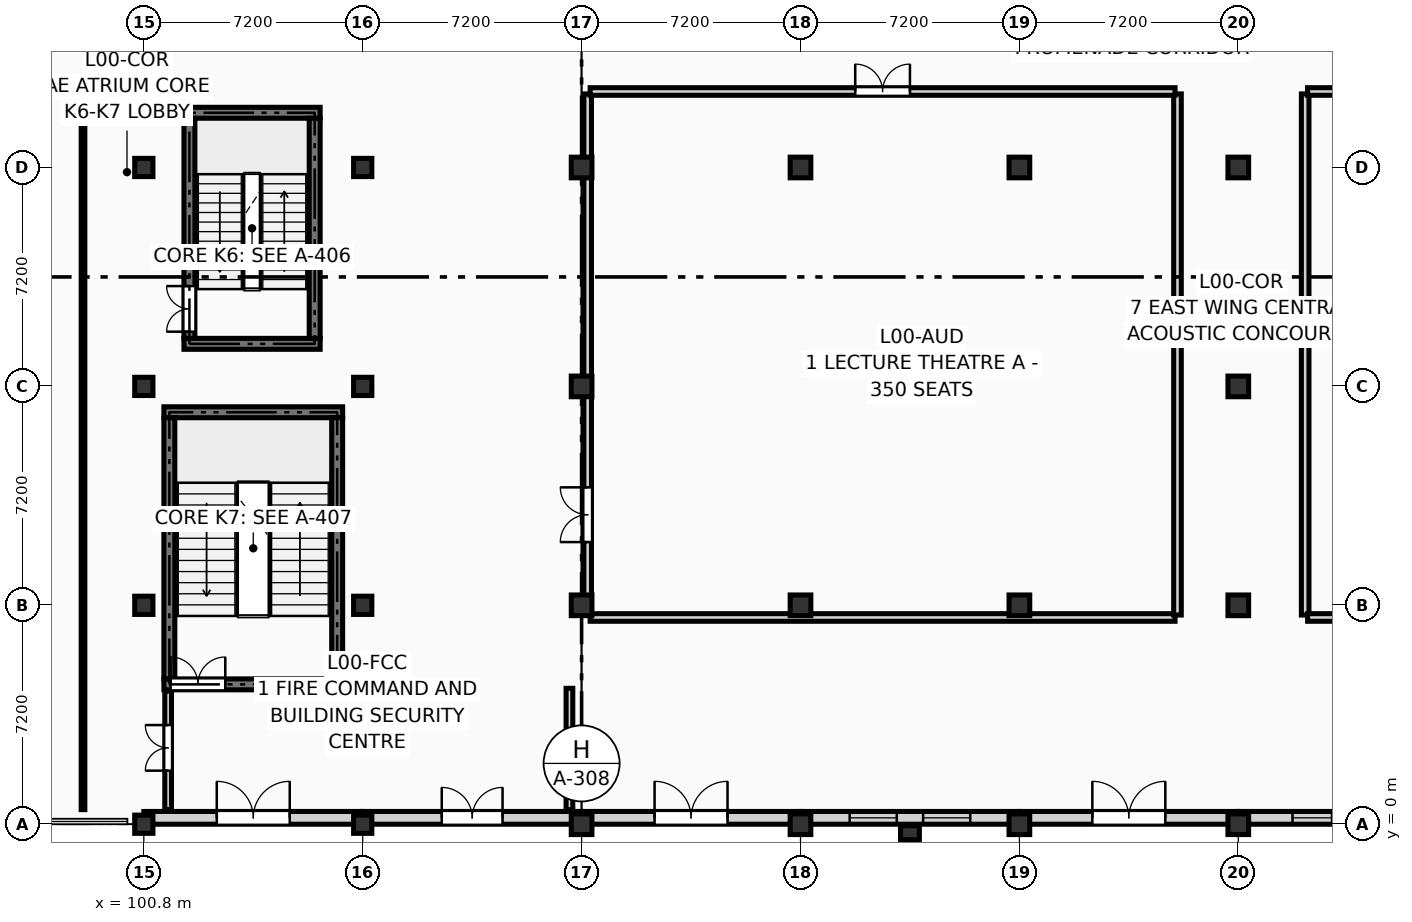
"""IFC4 building model, lengths in metres.
Left out: names, types, materials, properties, quantities, classifications, styles, units other than length and angle.
Written with IfcOpenShell. Run it as: python <this file> out.ifc"""

import sys

from ifc_helpers import new_model, si_unit, direction, frame, frame_2d, origin, origin_2d, place, context, subcontext, project, spatial, rectangle, extrude, element, fill, save


model = new_model("IFC4")
c1 = context("Model", 3, precision=1e-05, world=origin(), true_north=direction((0.0, 1.0)))
c2 = subcontext(c1, "Body", "Model", "MODEL_VIEW")
j1 = project(units=[si_unit("LENGTHUNIT", "METRE"), si_unit("PLANEANGLEUNIT", "RADIAN")], contexts=[c1])
p1 = place(None, origin())
s1 = spatial("IfcSite", under=j1, at=p1, CompositionType="ELEMENT")
p2 = place(p1, origin())
s2 = spatial("IfcBuilding", under=s1, at=p2, CompositionType="ELEMENT")
p3 = place(p2, origin())
s3 = spatial("IfcBuildingStorey", under=s2, at=p3, CompositionType="ELEMENT", Elevation=0.0)
for number, where, z_axis, x_axis in (
    (1, (100.8, 0.0, 0.0), (0.0, 0.0, 1.0), (1.0, 0.0, 0.0)),
    (2, (100.8, 7.2, 0.0), (0.0, 0.0, 1.0), (1.0, 0.0, 0.0)),
    (3, (100.8, 14.4, 0.0), (0.0, 0.0, 1.0), (1.0, 0.0, 0.0)),
    (4, (100.8, 21.6, 0.0), (0.0, 0.0, 1.0), (1.0, 0.0, 0.0)),
    (5, (108.0, 0.0, 0.0), (0.0, 0.0, 1.0), (1.0, 0.0, 0.0)),
    (6, (108.0, 7.2, 0.0), (0.0, 0.0, 1.0), (1.0, 0.0, 0.0)),
    (7, (108.0, 14.4, 0.0), (0.0, 0.0, 1.0), (1.0, 0.0, 0.0)),
    (8, (108.0, 21.6, 0.0), (0.0, 0.0, 1.0), (1.0, 0.0, 0.0)),
):
    element("IfcColumn", number, at=place(p3, frame(where, z_axis=z_axis, x_axis=x_axis)), inside=s3, PredefinedType="COLUMN", context=c2, shape_type="SweptSolid", body=[
        extrude(rectangle(XDim=0.6, YDim=0.6, at=origin_2d()), origin(), (0.0, 0.0, 1.0), 4.5),
    ])
for number, where, z_axis, x_axis in (
    (9, (115.2, 0.0, 0.0), (0.0, 0.0, 1.0), (1.0, 0.0, 0.0)),
    (10, (115.2, 7.2, 0.0), (0.0, 0.0, 1.0), (1.0, 0.0, 0.0)),
    (11, (115.2, 14.4, 0.0), (0.0, 0.0, 1.0), (1.0, 0.0, 0.0)),
    (12, (115.2, 21.6, 0.0), (0.0, 0.0, 1.0), (1.0, 0.0, 0.0)),
    (13, (122.4, 0.0, 0.0), (0.0, 0.0, 1.0), (1.0, 0.0, 0.0)),
    (14, (122.4, 7.2, 0.0), (0.0, 0.0, 1.0), (1.0, 0.0, 0.0)),
    (15, (122.4, 21.6, 0.0), (0.0, 0.0, 1.0), (1.0, 0.0, 0.0)),
    (16, (129.6, 0.0, 0.0), (0.0, 0.0, 1.0), (1.0, 0.0, 0.0)),
    (17, (129.6, 7.2, 0.0), (0.0, 0.0, 1.0), (1.0, 0.0, 0.0)),
    (18, (129.6, 21.6, 0.0), (0.0, 0.0, 1.0), (1.0, 0.0, 0.0)),
    (19, (136.8, 0.0, 0.0), (0.0, 0.0, 1.0), (1.0, 0.0, 0.0)),
    (20, (136.8, 7.2, 0.0), (0.0, 0.0, 1.0), (1.0, 0.0, 0.0)),
    (21, (136.8, 14.4, 0.0), (0.0, 0.0, 1.0), (1.0, 0.0, 0.0)),
    (22, (136.8, 21.6, 0.0), (0.0, 0.0, 1.0), (1.0, 0.0, 0.0)),
):
    element("IfcColumn", number, at=place(p3, frame(where, z_axis=z_axis, x_axis=x_axis)), inside=s3, PredefinedType="COLUMN", context=c2, shape_type="SweptSolid", body=[
        extrude(rectangle(XDim=0.68, YDim=0.68, at=origin_2d()), origin(), (0.0, 0.0, 1.0), 4.5),
    ])
p4 = place(p3, frame((126.0, -0.28, 0.0), z_axis=(0.0, 0.0, 1.0), x_axis=(0.0, 1.0, 0.0)))
e23 = element("IfcColumn", 23, at=p4, inside=s3, PredefinedType="PILASTER", context=c2, shape_type="SweptSolid", body=[
    extrude(rectangle(XDim=0.46, YDim=0.62, at=origin_2d()), origin(), (0.0, 0.0, 1.0), 4.5),
])
p5 = place(p3, frame((136.8, 0.21, 0.0), z_axis=(0.0, 0.0, 1.0), x_axis=(1.0, 0.0, 0.0)))
e24 = element("IfcWall", 24, at=p5, inside=s3, PredefinedType="SOLIDWALL", context=c2, shape_type="SweptSolid", body=[
    extrude(rectangle(XDim=7.2, YDim=0.42, at=frame_2d((3.6, 0.0))), origin(), (0.0, 0.0, 1.0), 3.62),
])
p6 = place(p5, frame((1.783, 0.0, 0.45)))
e25 = element("IfcOpeningElement", 25, at=p6, cuts=e24, PredefinedType="OPENING", context=c2, shape_type="SweptSolid", body=[
    extrude(rectangle(XDim=1.3, YDim=2.35, at=frame_2d((0.65, 1.175))), frame((0.0, 0.222, 0.0), z_axis=(0.0, -1.0, 0.0), x_axis=(1.0, 0.0, 0.0)), (0.0, 0.0, 1.0), 0.444),
])
p7 = place(p5, frame((4.117, 0.0, 0.45)))
e26 = element("IfcOpeningElement", 26, at=p7, cuts=e24, PredefinedType="OPENING", context=c2, shape_type="SweptSolid", body=[
    extrude(rectangle(XDim=1.3, YDim=2.35, at=frame_2d((0.65, 1.175))), frame((0.0, 0.222, 0.0), z_axis=(0.0, -1.0, 0.0), x_axis=(1.0, 0.0, 0.0)), (0.0, 0.0, 1.0), 0.444),
])
p8 = place(p3, frame((129.6, 0.21, 0.0), z_axis=(0.0, 0.0, 1.0), x_axis=(1.0, 0.0, 0.0)))
e27 = element("IfcWall", 27, at=p8, inside=s3, PredefinedType="SOLIDWALL", context=c2, shape_type="SweptSolid", body=[
    extrude(rectangle(XDim=7.2, YDim=0.42, at=frame_2d((3.6, 0.0))), origin(), (0.0, 0.0, 1.0), 3.62),
])
p9 = place(p8, frame((2.4, 0.0, 0.0)))
e28 = element("IfcOpeningElement", 28, at=p9, cuts=e27, PredefinedType="OPENING", context=c2, shape_type="SweptSolid", body=[
    extrude(rectangle(XDim=2.4, YDim=2.6, at=frame_2d((1.2, 1.3))), frame((0.0, 0.222, 0.0), z_axis=(0.0, -1.0, 0.0), x_axis=(1.0, 0.0, 0.0)), (0.0, 0.0, 1.0), 0.444),
])
p10 = place(p3, frame((122.4, 0.21, 0.0), z_axis=(0.0, 0.0, 1.0), x_axis=(1.0, 0.0, 0.0)))
e29 = element("IfcWall", 29, at=p10, inside=s3, PredefinedType="SOLIDWALL", context=c2, shape_type="SweptSolid", body=[
    extrude(rectangle(XDim=7.2, YDim=0.42, at=frame_2d((3.6, 0.0))), origin(), (0.0, 0.0, 1.0), 3.62),
])
p11 = place(p10, frame((1.617, 0.0, 0.45)))
e30 = element("IfcOpeningElement", 30, at=p11, cuts=e29, PredefinedType="OPENING", context=c2, shape_type="SweptSolid", body=[
    extrude(rectangle(XDim=1.55, YDim=2.85, at=frame_2d((0.775, 1.425))), frame((0.0, 0.222, 0.0), z_axis=(0.0, -1.0, 0.0), x_axis=(1.0, 0.0, 0.0)), (0.0, 0.0, 1.0), 0.444),
])
p12 = place(p10, frame((4.033, 0.0, 0.45)))
e31 = element("IfcOpeningElement", 31, at=p12, cuts=e29, PredefinedType="OPENING", context=c2, shape_type="SweptSolid", body=[
    extrude(rectangle(XDim=1.55, YDim=2.85, at=frame_2d((0.775, 1.425))), frame((0.0, 0.222, 0.0), z_axis=(0.0, -1.0, 0.0), x_axis=(1.0, 0.0, 0.0)), (0.0, 0.0, 1.0), 0.444),
])
p13 = place(p3, frame((115.2, 0.21, 0.0), z_axis=(0.0, 0.0, 1.0), x_axis=(1.0, 0.0, 0.0)))
e32 = element("IfcWall", 32, at=p13, inside=s3, PredefinedType="SOLIDWALL", context=c2, shape_type="SweptSolid", body=[
    extrude(rectangle(XDim=7.2, YDim=0.42, at=frame_2d((3.6, 0.0))), origin(), (0.0, 0.0, 1.0), 3.62),
])
p14 = place(p13, frame((2.4, 0.0, 0.0)))
e33 = element("IfcOpeningElement", 33, at=p14, cuts=e32, PredefinedType="OPENING", context=c2, shape_type="SweptSolid", body=[
    extrude(rectangle(XDim=2.4, YDim=2.6, at=frame_2d((1.2, 1.3))), frame((0.0, 0.222, 0.0), z_axis=(0.0, -1.0, 0.0), x_axis=(1.0, 0.0, 0.0)), (0.0, 0.0, 1.0), 0.444),
])
p15 = place(p3, frame((108.0, 0.21, 0.0), z_axis=(0.0, 0.0, 1.0), x_axis=(1.0, 0.0, 0.0)))
e34 = element("IfcWall", 34, at=p15, inside=s3, PredefinedType="SOLIDWALL", context=c2, shape_type="SweptSolid", body=[
    extrude(rectangle(XDim=7.2, YDim=0.42, at=frame_2d((3.6, 0.0))), origin(), (0.0, 0.0, 1.0), 3.62),
])
p16 = place(p15, frame((2.6, 0.0, 0.0)))
e35 = element("IfcOpeningElement", 35, at=p16, cuts=e34, PredefinedType="OPENING", context=c2, shape_type="SweptSolid", body=[
    extrude(rectangle(XDim=2.0, YDim=2.4, at=frame_2d((1.0, 1.2))), frame((0.0, 0.222, 0.0), z_axis=(0.0, -1.0, 0.0), x_axis=(1.0, 0.0, 0.0)), (0.0, 0.0, 1.0), 0.444),
])
p17 = place(p3, frame((100.8, 0.21, 0.0), z_axis=(0.0, 0.0, 1.0), x_axis=(1.0, 0.0, 0.0)))
e36 = element("IfcWall", 36, at=p17, inside=s3, PredefinedType="SOLIDWALL", context=c2, shape_type="SweptSolid", body=[
    extrude(rectangle(XDim=7.2, YDim=0.42, at=frame_2d((3.6, 0.0))), origin(), (0.0, 0.0, 1.0), 3.62),
])
p18 = place(p17, frame((2.4, 0.0, 0.0)))
e37 = element("IfcOpeningElement", 37, at=p18, cuts=e36, PredefinedType="OPENING", context=c2, shape_type="SweptSolid", body=[
    extrude(rectangle(XDim=2.4, YDim=2.6, at=frame_2d((1.2, 1.3))), frame((0.0, 0.222, 0.0), z_axis=(0.0, -1.0, 0.0), x_axis=(1.0, 0.0, 0.0)), (0.0, 0.0, 1.0), 0.444),
])
for number, where, z_axis, x_axis in (
    (38, (102.12, 15.8, 0.0), (0.0, 0.0, 1.0), (1.0, 0.0, 0.0)),
    (39, (102.12, 23.4, 0.0), (0.0, 0.0, 1.0), (1.0, 0.0, 0.0)),
):
    element("IfcWall", number, at=place(p3, frame(where, z_axis=z_axis, x_axis=x_axis)), inside=s3, PredefinedType="SHEAR", context=c2, shape_type="SweptSolid", body=[
        extrude(rectangle(XDim=4.48, YDim=0.36, at=frame_2d((2.24, 0.0))), origin(), (0.0, 0.0, 1.0), 4.25),
    ])
p19 = place(p3, frame((102.3, 15.98, 0.0), z_axis=(0.0, 0.0, 1.0), x_axis=(0.0, 1.0, 0.0)))
e40 = element("IfcWall", 40, at=p19, inside=s3, PredefinedType="SHEAR", context=c2, shape_type="SweptSolid", body=[
    extrude(rectangle(XDim=7.24, YDim=0.36, at=frame_2d((3.62, 0.0))), origin(), (0.0, 0.0, 1.0), 4.25),
])
p20 = place(p19, frame((0.22, 0.0, 0.0)))
e41 = element("IfcOpeningElement", 41, at=p20, cuts=e40, PredefinedType="OPENING", context=c2, shape_type="SweptSolid", body=[
    extrude(rectangle(XDim=1.5, YDim=2.2, at=frame_2d((0.75, 1.1))), frame((0.0, 0.192, 0.0), z_axis=(0.0, -1.0, 0.0), x_axis=(1.0, 0.0, 0.0)), (0.0, 0.0, 1.0), 0.384),
])
p21 = place(p3, frame((106.42, 15.98, 0.0), z_axis=(0.0, 0.0, 1.0), x_axis=(0.0, 1.0, 0.0)))
e42 = element("IfcWall", 42, at=p21, inside=s3, PredefinedType="SHEAR", context=c2, shape_type="SweptSolid", body=[
    extrude(rectangle(XDim=7.24, YDim=0.36, at=frame_2d((3.62, 0.0))), origin(), (0.0, 0.0, 1.0), 4.25),
])
p22 = place(p3, frame((101.46, 4.6, 0.0), z_axis=(0.0, 0.0, 1.0), x_axis=(1.0, 0.0, 0.0)))
e43 = element("IfcWall", 43, at=p22, inside=s3, PredefinedType="SHEAR", context=c2, shape_type="SweptSolid", body=[
    extrude(rectangle(XDim=5.88, YDim=0.36, at=frame_2d((2.94, 0.0))), origin(), (0.0, 0.0, 1.0), 4.25),
])
p23 = place(p22, frame((0.22, 0.0, 0.0)))
e44 = element("IfcOpeningElement", 44, at=p23, cuts=e43, PredefinedType="OPENING", context=c2, shape_type="SweptSolid", body=[
    extrude(rectangle(XDim=1.8, YDim=2.2, at=frame_2d((0.9, 1.1))), frame((0.0, 0.192, 0.0), z_axis=(0.0, -1.0, 0.0), x_axis=(1.0, 0.0, 0.0)), (0.0, 0.0, 1.0), 0.384),
])
p24 = place(p3, frame((101.46, 13.55, 0.0), z_axis=(0.0, 0.0, 1.0), x_axis=(1.0, 0.0, 0.0)))
e45 = element("IfcWall", 45, at=p24, inside=s3, PredefinedType="SHEAR", context=c2, shape_type="SweptSolid", body=[
    extrude(rectangle(XDim=5.88, YDim=0.36, at=frame_2d((2.94, 0.0))), origin(), (0.0, 0.0, 1.0), 4.25),
])
for number, where, z_axis, x_axis in (
    (46, (101.64, 4.78, 0.0), (0.0, 0.0, 1.0), (0.0, 1.0, 0.0)),
    (47, (107.16, 4.78, 0.0), (0.0, 0.0, 1.0), (0.0, 1.0, 0.0)),
):
    element("IfcWall", number, at=place(p3, frame(where, z_axis=z_axis, x_axis=x_axis)), inside=s3, PredefinedType="SHEAR", context=c2, shape_type="SweptSolid", body=[
        extrude(rectangle(XDim=8.59, YDim=0.36, at=frame_2d((4.295, 0.0))), origin(), (0.0, 0.0, 1.0), 4.25),
    ])
p25 = place(p3, frame((98.8, 0.48, 0.0), z_axis=(0.0, 0.0, 1.0), x_axis=(0.0, 1.0, 0.0)))
e48 = element("IfcWall", 48, at=p25, inside=s3, PredefinedType="PARTITIONING", context=c2, shape_type="SweptSolid", body=[
    extrude(rectangle(XDim=23.84, YDim=0.12, at=frame_2d((11.92, 0.0))), origin(), (0.0, 0.0, 1.0), 4.235),
])
p26 = place(p3, frame((72.46, 24.4, 0.0), z_axis=(0.0, 0.0, 1.0), x_axis=(1.0, 0.0, 0.0)))
e49 = element("IfcWall", 49, at=p26, inside=s3, PredefinedType="PARTITIONING", context=c2, shape_type="SweptSolid", body=[
    extrude(rectangle(XDim=26.26, YDim=0.12, at=frame_2d((13.13, 0.0))), origin(), (0.0, 0.0, 1.0), 4.235),
])
p27 = place(p26, frame((12.28, 0.0, 0.0)))
e50 = element("IfcOpeningElement", 50, at=p27, cuts=e49, PredefinedType="OPENING", context=c2, shape_type="SweptSolid", body=[
    extrude(rectangle(XDim=1.7, YDim=2.28, at=frame_2d((0.85, 1.14))), frame((0.0, 0.072, 0.0), z_axis=(0.0, -1.0, 0.0), x_axis=(1.0, 0.0, 0.0)), (0.0, 0.0, 1.0), 0.144),
])
p28 = place(p3, frame((101.6, 0.48, 0.0), z_axis=(0.0, 0.0, 1.0), x_axis=(0.0, 1.0, 0.0)))
e51 = element("IfcWall", 51, at=p28, inside=s3, PredefinedType="PARTITIONING", context=c2, shape_type="SweptSolid", body=[
    extrude(rectangle(XDim=3.9, YDim=0.22, at=frame_2d((1.95, 0.0))), origin(), (0.0, 0.0, 1.0), 4.235),
])
p29 = place(p28, frame((1.282, 0.0, 0.0)))
e52 = element("IfcOpeningElement", 52, at=p29, cuts=e51, PredefinedType="OPENING", context=c2, shape_type="SweptSolid", body=[
    extrude(rectangle(XDim=1.5, YDim=2.25, at=frame_2d((0.75, 1.125))), frame((0.0, 0.122, 0.0), z_axis=(0.0, -1.0, 0.0), x_axis=(1.0, 0.0, 0.0)), (0.0, 0.0, 1.0), 0.244),
])
p30 = place(p3, frame((114.8, 0.48, 0.0), z_axis=(0.0, 0.0, 1.0), x_axis=(0.0, 1.0, 0.0)))
e53 = element("IfcWall", 53, at=p30, inside=s3, PredefinedType="PARTITIONING", context=c2, shape_type="SweptSolid", body=[
    extrude(rectangle(XDim=3.99, YDim=0.22, at=frame_2d((1.995, 0.0))), origin(), (0.0, 0.0, 1.0), 3.385),
])
p31 = place(p3, frame((115.4, 6.88, 0.0), z_axis=(0.0, 0.0, 1.0), x_axis=(0.0, 1.0, 0.0)))
e54 = element("IfcWall", 54, at=p31, inside=s3, PredefinedType="PARTITIONING", context=c2, shape_type="SweptSolid", body=[
    extrude(rectangle(XDim=17.14, YDim=0.25, at=frame_2d((8.57, 0.0))), origin(), (0.0, 0.0, 1.0), 3.385),
])
p32 = place(p31, frame((2.4, 0.0, 0.0)))
e55 = element("IfcOpeningElement", 55, at=p32, cuts=e54, PredefinedType="OPENING", context=c2, shape_type="SweptSolid", body=[
    extrude(rectangle(XDim=1.8, YDim=2.3, at=frame_2d((0.9, 1.15))), frame((0.0, 0.137, 0.0), z_axis=(0.0, -1.0, 0.0), x_axis=(1.0, 0.0, 0.0)), (0.0, 0.0, 1.0), 0.274),
])
p33 = place(p3, frame((115.48, 6.8, 0.0), z_axis=(0.0, 0.0, 1.0), x_axis=(1.0, 0.0, 0.0)))
e56 = element("IfcWall", 56, at=p33, inside=s3, PredefinedType="PARTITIONING", context=c2, shape_type="SweptSolid", body=[
    extrude(rectangle(XDim=19.24, YDim=0.25, at=frame_2d((9.62, 0.0))), origin(), (0.0, 0.0, 1.0), 7.525),
])
p34 = place(p3, frame((134.8, 6.88, 0.0), z_axis=(0.0, 0.0, 1.0), x_axis=(0.0, 1.0, 0.0)))
e57 = element("IfcWall", 57, at=p34, inside=s3, PredefinedType="PARTITIONING", context=c2, shape_type="SweptSolid", body=[
    extrude(rectangle(XDim=17.14, YDim=0.25, at=frame_2d((8.57, 0.0))), origin(), (0.0, 0.0, 1.0), 8.185),
])
p35 = place(p3, frame((115.48, 24.1, 0.0), z_axis=(0.0, 0.0, 1.0), x_axis=(1.0, 0.0, 0.0)))
e58 = element("IfcWall", 58, at=p35, inside=s3, PredefinedType="PARTITIONING", context=c2, shape_type="SweptSolid", body=[
    extrude(rectangle(XDim=19.24, YDim=0.25, at=frame_2d((9.62, 0.0))), origin(), (0.0, 0.0, 1.0), 8.185),
])
p36 = place(p35, frame((8.72, 0.0, 0.0)))
e59 = element("IfcOpeningElement", 59, at=p36, cuts=e58, PredefinedType="OPENING", context=c2, shape_type="SweptSolid", body=[
    extrude(rectangle(XDim=1.8, YDim=2.3, at=frame_2d((0.9, 1.15))), frame((0.0, 0.137, 0.0), z_axis=(0.0, -1.0, 0.0), x_axis=(1.0, 0.0, 0.0)), (0.0, 0.0, 1.0), 0.274),
])
p37 = place(p3, frame((139.0, 6.88, 0.0), z_axis=(0.0, 0.0, 1.0), x_axis=(0.0, 1.0, 0.0)))
e60 = element("IfcWall", 60, at=p37, inside=s3, PredefinedType="PARTITIONING", context=c2, shape_type="SweptSolid", body=[
    extrude(rectangle(XDim=17.14, YDim=0.25, at=frame_2d((8.57, 0.0))), origin(), (0.0, 0.0, 1.0), 8.185),
])
p38 = place(p3, frame((139.08, 6.8, 0.0), z_axis=(0.0, 0.0, 1.0), x_axis=(1.0, 0.0, 0.0)))
e61 = element("IfcWall", 61, at=p38, inside=s3, PredefinedType="PARTITIONING", context=c2, shape_type="SweptSolid", body=[
    extrude(rectangle(XDim=23.24, YDim=0.25, at=frame_2d((11.62, 0.0))), origin(), (0.0, 0.0, 1.0), 7.525),
])
p39 = place(p3, frame((139.08, 24.1, 0.0), z_axis=(0.0, 0.0, 1.0), x_axis=(1.0, 0.0, 0.0)))
e62 = element("IfcWall", 62, at=p39, inside=s3, PredefinedType="PARTITIONING", context=c2, shape_type="SweptSolid", body=[
    extrude(rectangle(XDim=23.24, YDim=0.25, at=frame_2d((11.62, 0.0))), origin(), (0.0, 0.0, 1.0), 8.185),
])
p40 = place(p39, frame((10.282, 0.0, 0.0)))
e63 = element("IfcOpeningElement", 63, at=p40, cuts=e62, PredefinedType="OPENING", context=c2, shape_type="SweptSolid", body=[
    extrude(rectangle(XDim=1.8, YDim=2.3, at=frame_2d((0.9, 1.15))), frame((0.0, 0.137, 0.0), z_axis=(0.0, -1.0, 0.0), x_axis=(1.0, 0.0, 0.0)), (0.0, 0.0, 1.0), 0.274),
])
p41 = place(p6, origin())
e64 = element("IfcWindow", 64, at=p41, inside=s3, PartitioningType="SINGLE_PANEL", PredefinedType="WINDOW", context=c2, shape_type="SweptSolid", body=[
    extrude(rectangle(XDim=1.3, YDim=2.35, at=frame_2d((0.65, 1.175))), frame((0.0, 0.03, 0.0), z_axis=(0.0, -1.0, 0.0), x_axis=(1.0, 0.0, 0.0)), (0.0, 0.0, 1.0), 0.06),
])
fill(e25, e64)
p42 = place(p9, origin())
e65 = element("IfcDoor", 65, at=p42, inside=s3, OperationType="DOUBLE_DOOR_SINGLE_SWING", PredefinedType="DOOR", context=c2, shape_type="SweptSolid", body=[
    extrude(rectangle(XDim=2.4, YDim=2.6, at=frame_2d((1.2, 1.3))), frame((0.0, 0.025, 0.0), z_axis=(0.0, -1.0, 0.0), x_axis=(1.0, 0.0, 0.0)), (0.0, 0.0, 1.0), 0.05),
])
fill(e28, e65)
p43 = place(p11, origin())
e66 = element("IfcWindow", 66, at=p43, inside=s3, PartitioningType="SINGLE_PANEL", PredefinedType="WINDOW", context=c2, shape_type="SweptSolid", body=[
    extrude(rectangle(XDim=1.55, YDim=2.85, at=frame_2d((0.775, 1.425))), frame((0.0, 0.03, 0.0), z_axis=(0.0, -1.0, 0.0), x_axis=(1.0, 0.0, 0.0)), (0.0, 0.0, 1.0), 0.06),
])
fill(e30, e66)
p44 = place(p12, origin())
e67 = element("IfcWindow", 67, at=p44, inside=s3, PartitioningType="SINGLE_PANEL", PredefinedType="WINDOW", context=c2, shape_type="SweptSolid", body=[
    extrude(rectangle(XDim=1.55, YDim=2.85, at=frame_2d((0.775, 1.425))), frame((0.0, 0.03, 0.0), z_axis=(0.0, -1.0, 0.0), x_axis=(1.0, 0.0, 0.0)), (0.0, 0.0, 1.0), 0.06),
])
fill(e31, e67)
p45 = place(p14, origin())
e68 = element("IfcDoor", 68, at=p45, inside=s3, OperationType="DOUBLE_DOOR_SINGLE_SWING", PredefinedType="DOOR", context=c2, shape_type="SweptSolid", body=[
    extrude(rectangle(XDim=2.4, YDim=2.6, at=frame_2d((1.2, 1.3))), frame((0.0, 0.025, 0.0), z_axis=(0.0, -1.0, 0.0), x_axis=(1.0, 0.0, 0.0)), (0.0, 0.0, 1.0), 0.05),
])
fill(e33, e68)
p46 = place(p16, origin())
e69 = element("IfcDoor", 69, at=p46, inside=s3, OperationType="DOUBLE_DOOR_SINGLE_SWING", PredefinedType="DOOR", context=c2, shape_type="SweptSolid", body=[
    extrude(rectangle(XDim=2.0, YDim=2.4, at=frame_2d((1.0, 1.2))), frame((0.0, 0.025, 0.0), z_axis=(0.0, -1.0, 0.0), x_axis=(1.0, 0.0, 0.0)), (0.0, 0.0, 1.0), 0.05),
])
fill(e35, e69)
p47 = place(p18, origin())
e70 = element("IfcDoor", 70, at=p47, inside=s3, OperationType="DOUBLE_DOOR_SINGLE_SWING", PredefinedType="DOOR", context=c2, shape_type="SweptSolid", body=[
    extrude(rectangle(XDim=2.4, YDim=2.6, at=frame_2d((1.2, 1.3))), frame((0.0, 0.025, 0.0), z_axis=(0.0, -1.0, 0.0), x_axis=(1.0, 0.0, 0.0)), (0.0, 0.0, 1.0), 0.05),
])
fill(e37, e70)
p48 = place(p20, origin())
e71 = element("IfcDoor", 71, at=p48, inside=s3, OperationType="DOUBLE_DOOR_SINGLE_SWING", PredefinedType="DOOR", context=c2, shape_type="SweptSolid", body=[
    extrude(rectangle(XDim=1.5, YDim=2.2, at=frame_2d((0.75, 1.1))), frame((0.0, 0.025, 0.0), z_axis=(0.0, -1.0, 0.0), x_axis=(1.0, 0.0, 0.0)), (0.0, 0.0, 1.0), 0.05),
])
fill(e41, e71)
p49 = place(p23, origin())
e72 = element("IfcDoor", 72, at=p49, inside=s3, OperationType="DOUBLE_DOOR_SINGLE_SWING", PredefinedType="DOOR", context=c2, shape_type="SweptSolid", body=[
    extrude(rectangle(XDim=1.8, YDim=2.2, at=frame_2d((0.9, 1.1))), frame((0.0, 0.025, 0.0), z_axis=(0.0, -1.0, 0.0), x_axis=(1.0, 0.0, 0.0)), (0.0, 0.0, 1.0), 0.05),
])
fill(e44, e72)
p50 = place(p29, origin())
e73 = element("IfcDoor", 73, at=p50, inside=s3, OperationType="DOUBLE_DOOR_SINGLE_SWING", PredefinedType="DOOR", context=c2, shape_type="SweptSolid", body=[
    extrude(rectangle(XDim=1.5, YDim=2.25, at=frame_2d((0.75, 1.125))), frame((0.0, 0.025, 0.0), z_axis=(0.0, -1.0, 0.0), x_axis=(1.0, 0.0, 0.0)), (0.0, 0.0, 1.0), 0.05),
])
fill(e52, e73)
p51 = place(p36, origin())
e74 = element("IfcDoor", 74, at=p51, inside=s3, OperationType="DOUBLE_DOOR_SINGLE_SWING", PredefinedType="DOOR", context=c2, shape_type="SweptSolid", body=[
    extrude(rectangle(XDim=1.8, YDim=2.3, at=frame_2d((0.9, 1.15))), frame((0.0, 0.025, 0.0), z_axis=(0.0, -1.0, 0.0), x_axis=(1.0, 0.0, 0.0)), (0.0, 0.0, 1.0), 0.05),
])
fill(e59, e74)
p52 = place(p32, origin())
e75 = element("IfcDoor", 75, at=p52, inside=s3, OperationType="DOUBLE_DOOR_SINGLE_SWING", PredefinedType="DOOR", context=c2, shape_type="SweptSolid", body=[
    extrude(rectangle(XDim=1.8, YDim=2.3, at=frame_2d((0.9, 1.15))), frame((0.0, 0.025, 0.0), z_axis=(0.0, -1.0, 0.0), x_axis=(1.0, 0.0, 0.0)), (0.0, 0.0, 1.0), 0.05),
])
fill(e55, e75)
save(model, sys.argv[1])
